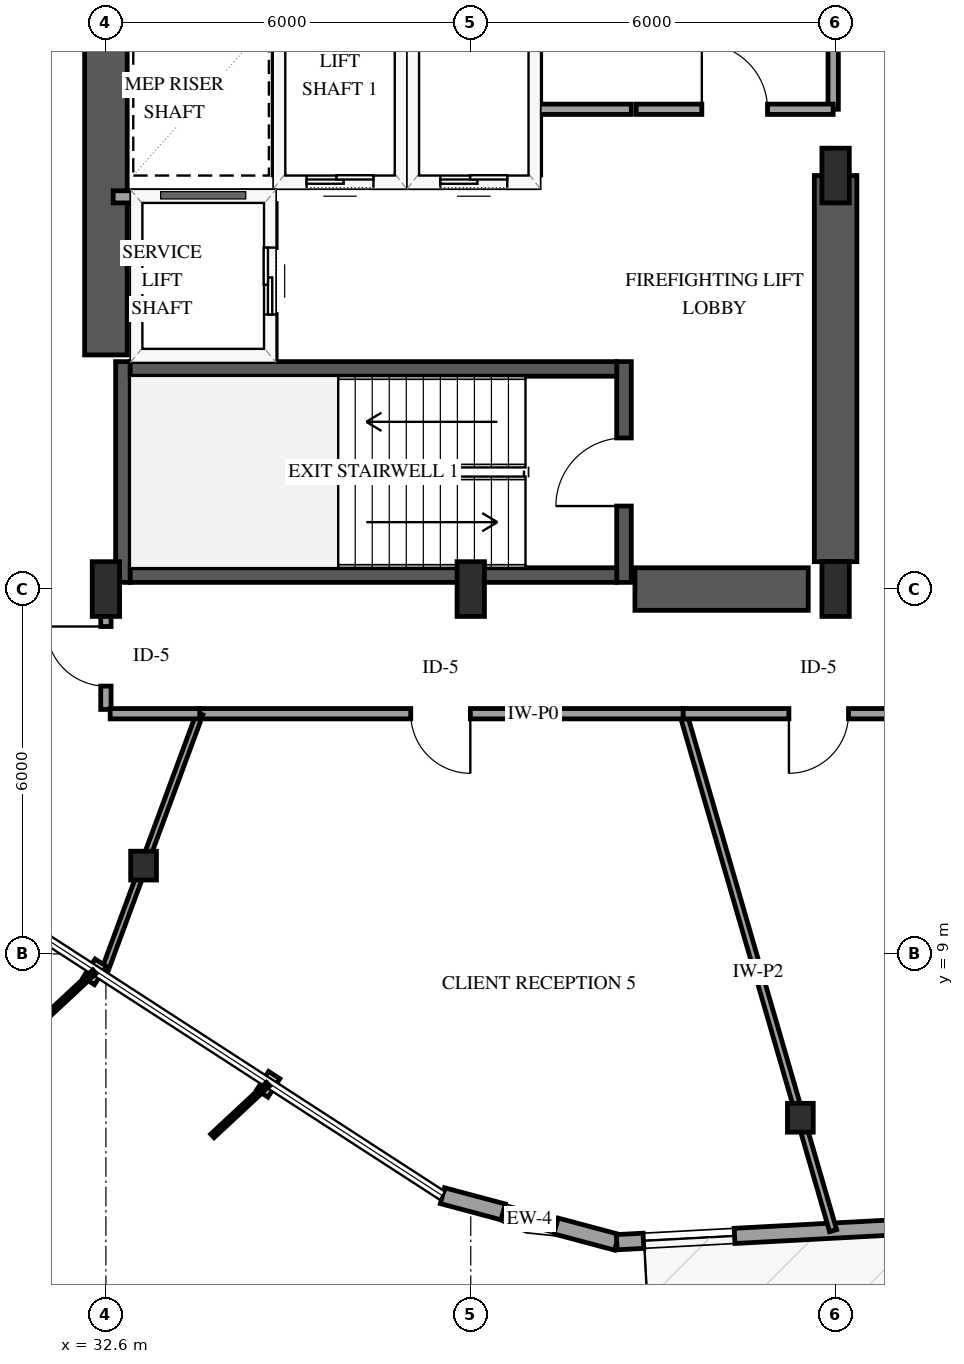
"""IFC4 building model, lengths in metres.
Left out: names, types, materials, properties, quantities, classifications, styles, units other than length and angle.
Written with IfcOpenShell. Run it as: python <this file> out.ifc"""

import sys

from ifc_helpers import new_model, si_unit, direction, frame, frame_2d, origin, origin_2d, place, context, subcontext, project, spatial, rectangle, i_section, extrude, element, fill, save


model = new_model("IFC4")
c1 = context("Model", 3, precision=1e-05, world=origin(), true_north=direction((0.0, 1.0)))
c2 = subcontext(c1, "Body", "Model", "MODEL_VIEW")
j1 = project(units=[si_unit("LENGTHUNIT", "METRE"), si_unit("PLANEANGLEUNIT", "RADIAN")], contexts=[c1])
p1 = place(None, origin())
s1 = spatial("IfcSite", under=j1, at=p1, CompositionType="ELEMENT")
p2 = place(p1, origin())
s2 = spatial("IfcBuilding", under=s1, at=p2, CompositionType="ELEMENT")
p3 = place(p2, frame((0.0, 0.0, 38.6)))
s3 = spatial("IfcBuildingStorey", under=s2, at=p3, CompositionType="ELEMENT", Elevation=38.6)
p4 = place(p3, frame((32.88, 15.11, 0.0), z_axis=(0.0, 0.0, 1.0), x_axis=(0.0, 1.0, 0.0)))
e1 = element("IfcWall", 1, at=p4, inside=s3, PredefinedType="SHEAR", context=c2, shape_type="SweptSolid", body=[
    extrude(rectangle(XDim=3.63, YDim=0.24, at=frame_2d((1.815, 0.0))), origin(), (0.0, 0.0, 1.0), 4.0),
])
p5 = place(p3, frame((41.12, 15.11, 0.0), z_axis=(0.0, 0.0, 1.0), x_axis=(0.0, 1.0, 0.0)))
e2 = element("IfcWall", 2, at=p5, inside=s3, PredefinedType="SHEAR", context=c2, shape_type="SweptSolid", body=[
    extrude(rectangle(XDim=3.63, YDim=0.24, at=frame_2d((1.815, 0.0))), origin(), (0.0, 0.0, 1.0), 4.0),
])
p6 = place(p5, frame((1.255, 0.0, 0.0)))
e3 = element("IfcOpeningElement", 3, at=p6, cuts=e2, PredefinedType="OPENING", context=c2, shape_type="SweptSolid", body=[
    extrude(rectangle(XDim=1.12, YDim=2.15, at=frame_2d((0.56, 1.075))), frame((0.0, 0.13, 0.0), z_axis=(0.0, -1.0, 0.0), x_axis=(1.0, 0.0, 0.0)), (0.0, 0.0, 1.0), 0.26),
])
for number, where, z_axis, x_axis in (
    (4, (33.0, 15.23, 0.0), (0.0, 0.0, 1.0), (1.0, 0.0, 0.0)),
    (5, (33.0, 18.62, 0.0), (0.0, 0.0, 1.0), (1.0, 0.0, 0.0)),
):
    element("IfcWall", number, at=place(p3, frame(where, z_axis=z_axis, x_axis=x_axis)), inside=s3, PredefinedType="SHEAR", context=c2, shape_type="SweptSolid", body=[
        extrude(rectangle(XDim=8.0, YDim=0.24, at=frame_2d((4.0, 0.0))), origin(), (0.0, 0.0, 1.0), 4.0),
    ])
p7 = place(p3, frame((32.6, 18.85, 0.0), z_axis=(0.0, 0.0, 1.0), x_axis=(0.0, 1.0, 0.0)))
e6 = element("IfcWall", 6, at=p7, inside=s3, PredefinedType="SHEAR", context=c2, shape_type="SweptSolid", body=[
    extrude(rectangle(XDim=12.3, YDim=0.7, at=frame_2d((6.15, 0.0))), origin(), (0.0, 0.0, 1.0), 4.0),
])
p8 = place(p3, frame((41.3, 15.0, 0.0), z_axis=(0.0, 0.0, 1.0), x_axis=(1.0, 0.0, 0.0)))
e7 = element("IfcWall", 7, at=p8, inside=s3, PredefinedType="SHEAR", context=c2, shape_type="SweptSolid", body=[
    extrude(rectangle(XDim=2.85, YDim=0.7, at=frame_2d((1.425, 0.0))), origin(), (0.0, 0.0, 1.0), 4.0),
])
p9 = place(p3, frame((44.6, 15.45, 0.0), z_axis=(0.0, 0.0, 1.0), x_axis=(0.0, 1.0, 0.0)))
e8 = element("IfcWall", 8, at=p9, inside=s3, PredefinedType="SHEAR", context=c2, shape_type="SweptSolid", body=[
    extrude(rectangle(XDim=6.35, YDim=0.7, at=frame_2d((3.175, 0.0))), origin(), (0.0, 0.0, 1.0), 4.0),
])
for number, where, z_axis, x_axis in (
    (9, (32.6, 15.0, 0.0), (0.0, 0.0, 1.0), (1.0, 0.0, 0.0)),
    (10, (38.6, 15.0, 0.0), (0.0, 0.0, 1.0), (1.0, 0.0, 0.0)),
    (11, (44.6, 15.0, 0.0), (0.0, 0.0, 1.0), (1.0, 0.0, 0.0)),
    (12, (44.6, 21.8, 0.0), (0.0, 0.0, 1.0), (1.0, 0.0, 0.0)),
):
    element("IfcColumn", number, at=place(p3, frame(where, z_axis=z_axis, x_axis=x_axis)), inside=s3, PredefinedType="PILASTER", context=c2, shape_type="SweptSolid", body=[
        extrude(rectangle(XDim=0.45, YDim=0.9, at=origin_2d()), origin(), (0.0, 0.0, 1.0), 4.0),
    ])
for number, where, z_axis, x_axis in (
    (13, (33.219, 10.452, 0.0), (0.0, 0.0, 1.0), (1.0, 0.0, 0.0)),
    (14, (44.02, 6.306, 0.0), (0.0, 0.0, 1.0), (1.0, 0.0, 0.0)),
):
    element("IfcColumn", number, at=place(p3, frame(where, z_axis=z_axis, x_axis=x_axis)), inside=s3, PredefinedType="COLUMN", context=c2, shape_type="SweptSolid", body=[
        extrude(i_section(OverallWidth=0.424, OverallDepth=0.474, WebThickness=0.048, FlangeThickness=0.077, FilletRadius=0.038, at=origin_2d()), origin(), (0.0, 0.0, 1.0), 4.0),
    ])
p10 = place(p3, frame((38.135, 5.024, 0.0), z_axis=(0.0, 0.0, 1.0), x_axis=(0.966192585346, -0.257821426615, 0.0)))
e15 = element("IfcWall", 15, at=p10, inside=s3, PredefinedType="SOLIDWALL", context=c2, shape_type="SweptSolid", body=[
    extrude(rectangle(XDim=2.967, YDim=0.27, at=frame_2d((1.483, 0.0))), origin(), (0.0, 0.0, 1.0), 3.079),
])
p11 = place(p10, frame((1.033, 0.0, 0.75)))
e16 = element("IfcOpeningElement", 16, at=p11, cuts=e15, PredefinedType="OPENING", context=c2, shape_type="SweptSolid", body=[
    extrude(rectangle(XDim=0.9, YDim=1.5, at=frame_2d((0.45, 0.75))), frame((0.0, 0.145, 0.0), z_axis=(0.0, -1.0, 0.0), x_axis=(1.0, 0.0, 0.0)), (0.0, 0.0, 1.0), 0.29),
])
p12 = place(p3, frame((41.001, 4.259, 0.0), z_axis=(0.0, 0.0, 1.0), x_axis=(0.998573514947, 0.053394149934, 0.0)))
e17 = element("IfcWall", 17, at=p12, inside=s3, PredefinedType="SOLIDWALL", context=c2, shape_type="SweptSolid", body=[
    extrude(rectangle(XDim=10.201, YDim=0.25, at=frame_2d((5.101, 0.0))), origin(), (0.0, 0.0, 1.0), 3.079),
])
p13 = place(p12, frame((4.601, 0.0, 0.0)))
e18 = element("IfcOpeningElement", 18, at=p13, cuts=e17, PredefinedType="OPENING", context=c2, shape_type="SweptSolid", body=[
    extrude(rectangle(XDim=1.05, YDim=2.15, at=frame_2d((0.525, 1.075))), frame((0.0, 0.135, 0.0), z_axis=(0.0, -1.0, 0.0), x_axis=(1.0, 0.0, 0.0)), (0.0, 0.0, 1.0), 0.27),
])
p14 = place(p12, frame((0.44, 0.0, 0.72)))
e19 = element("IfcOpeningElement", 19, at=p14, cuts=e17, PredefinedType="OPENING", context=c2, shape_type="SweptSolid", body=[
    extrude(rectangle(XDim=1.5, YDim=1.7, at=frame_2d((0.75, 0.85))), frame((0.0, 0.135, 0.0), z_axis=(0.0, -1.0, 0.0), x_axis=(1.0, 0.0, 0.0)), (0.0, 0.0, 1.0), 0.27),
])
p15 = place(p12, frame((6.291, 0.0, 0.72)))
e20 = element("IfcOpeningElement", 20, at=p15, cuts=e17, PredefinedType="OPENING", context=c2, shape_type="SweptSolid", body=[
    extrude(rectangle(XDim=1.5, YDim=1.7, at=frame_2d((0.75, 0.85))), frame((0.0, 0.135, 0.0), z_axis=(0.0, -1.0, 0.0), x_axis=(1.0, 0.0, 0.0)), (0.0, 0.0, 1.0), 0.27),
])
p16 = place(p3, frame((35.45, 21.7, 0.0), z_axis=(0.0, 0.0, 1.0), x_axis=(1.0, 0.0, 0.0)))
e21 = element("IfcWall", 21, at=p16, inside=s3, PredefinedType="SOLIDWALL", context=c2, shape_type="SweptSolid", body=[
    extrude(rectangle(XDim=2.0, YDim=0.2, at=frame_2d((1.0, 0.0))), origin(), (0.0, 0.0, 1.0), 3.7),
])
p17 = place(p16, frame((0.45, 0.0, 0.0)))
e22 = element("IfcOpeningElement", 22, at=p17, cuts=e21, PredefinedType="OPENING", context=c2, shape_type="SweptSolid", body=[
    extrude(rectangle(XDim=1.1, YDim=2.15, at=frame_2d((0.55, 1.075))), frame((0.0, 0.11, 0.0), z_axis=(0.0, -1.0, 0.0), x_axis=(1.0, 0.0, 0.0)), (0.0, 0.0, 1.0), 0.22),
])
for number, where, z_axis, x_axis in (
    (23, (35.45, 21.81, 0.0), (0.0, 0.0, 1.0), (0.0, 1.0, 0.0)),
    (24, (37.45, 21.81, 0.0), (0.0, 0.0, 1.0), (0.0, 1.0, 0.0)),
):
    element("IfcWall", number, at=place(p3, frame(where, z_axis=z_axis, x_axis=x_axis)), inside=s3, PredefinedType="SOLIDWALL", context=c2, shape_type="SweptSolid", body=[
        extrude(rectangle(XDim=2.38, YDim=0.2, at=frame_2d((1.19, 0.0))), origin(), (0.0, 0.0, 1.0), 3.7),
    ])
p18 = place(p3, frame((37.65, 21.7, 0.0), z_axis=(0.0, 0.0, 1.0), x_axis=(1.0, 0.0, 0.0)))
e25 = element("IfcWall", 25, at=p18, inside=s3, PredefinedType="SOLIDWALL", context=c2, shape_type="SweptSolid", body=[
    extrude(rectangle(XDim=2.0, YDim=0.2, at=frame_2d((1.0, 0.0))), origin(), (0.0, 0.0, 1.0), 3.7),
])
p19 = place(p18, frame((0.45, 0.0, 0.0)))
e26 = element("IfcOpeningElement", 26, at=p19, cuts=e25, PredefinedType="OPENING", context=c2, shape_type="SweptSolid", body=[
    extrude(rectangle(XDim=1.1, YDim=2.15, at=frame_2d((0.55, 1.075))), frame((0.0, 0.11, 0.0), z_axis=(0.0, -1.0, 0.0), x_axis=(1.0, 0.0, 0.0)), (0.0, 0.0, 1.0), 0.22),
])
p20 = place(p3, frame((39.65, 21.81, 0.0), z_axis=(0.0, 0.0, 1.0), x_axis=(0.0, 1.0, 0.0)))
e27 = element("IfcWall", 27, at=p20, inside=s3, PredefinedType="SOLIDWALL", context=c2, shape_type="SweptSolid", body=[
    extrude(rectangle(XDim=2.38, YDim=0.2, at=frame_2d((1.19, 0.0))), origin(), (0.0, 0.0, 1.0), 3.7),
])
p21 = place(p3, frame((32.72, 21.45, 0.0), z_axis=(0.0, 0.0, 1.0), x_axis=(1.0, 0.0, 0.0)))
e28 = element("IfcWall", 28, at=p21, inside=s3, PredefinedType="SOLIDWALL", context=c2, shape_type="SweptSolid", body=[
    extrude(rectangle(XDim=2.58, YDim=0.2, at=frame_2d((1.29, 0.0))), origin(), (0.0, 0.0, 1.0), 3.7),
])
p22 = place(p3, frame((35.3, 18.79, 0.0), z_axis=(0.0, 0.0, 1.0), x_axis=(0.0, 1.0, 0.0)))
e29 = element("IfcWall", 29, at=p22, inside=s3, PredefinedType="SOLIDWALL", context=c2, shape_type="SweptSolid", body=[
    extrude(rectangle(XDim=2.55, YDim=0.2, at=frame_2d((1.275, 0.0))), origin(), (0.0, 0.0, 1.0), 3.7),
])
p23 = place(p22, frame((0.725, 0.0, 0.0)))
e30 = element("IfcOpeningElement", 30, at=p23, cuts=e29, PredefinedType="OPENING", context=c2, shape_type="SweptSolid", body=[
    extrude(rectangle(XDim=1.1, YDim=2.15, at=frame_2d((0.55, 1.075))), frame((0.0, 0.11, 0.0), z_axis=(0.0, -1.0, 0.0), x_axis=(1.0, 0.0, 0.0)), (0.0, 0.0, 1.0), 0.22),
])
p24 = place(p3, frame((42.094, 12.95, 0.0), z_axis=(0.0, 0.0, 1.0), x_axis=(0.27850409571, -0.96043504136, 0.0)))
e31 = element("IfcWall", 31, at=p24, inside=s3, PredefinedType="PARTITIONING", context=c2, shape_type="SweptSolid", body=[
    extrude(rectangle(XDim=8.851, YDim=0.12, at=frame_2d((4.426, 0.0))), origin(), (0.0, 0.0, 1.0), 2.995),
])
p25 = place(p3, frame((42.094, 12.95, 0.0), z_axis=(0.0, 0.0, 1.0), x_axis=(-1.0, 0.0, 0.0)))
e32 = element("IfcWall", 32, at=p25, inside=s3, PredefinedType="PARTITIONING", context=c2, shape_type="SweptSolid", body=[
    extrude(rectangle(XDim=7.951, YDim=0.17, at=frame_2d((3.976, 0.0))), origin(), (0.0, 0.0, 1.0), 3.7),
])
p26 = place(p25, frame((3.501, 0.0, 0.0)))
e33 = element("IfcOpeningElement", 33, at=p26, cuts=e32, PredefinedType="OPENING", context=c2, shape_type="SweptSolid", body=[
    extrude(rectangle(XDim=0.98, YDim=2.15, at=frame_2d((0.49, 1.075))), frame((0.0, 0.095, 0.0), z_axis=(0.0, -1.0, 0.0), x_axis=(1.0, 0.0, 0.0)), (0.0, 0.0, 1.0), 0.19),
])
p27 = place(p3, frame((44.56, 29.8, 0.0), z_axis=(0.0, 0.0, 1.0), x_axis=(0.0, -1.0, 0.0)))
e34 = element("IfcWall", 34, at=p27, inside=s3, PredefinedType="PARTITIONING", context=c2, shape_type="SweptSolid", body=[
    extrude(rectangle(XDim=6.91, YDim=0.17, at=frame_2d((3.455, 0.0))), origin(), (0.0, 0.0, 1.0), 2.74),
])
p28 = place(p27, frame((2.915, 0.0, 0.0)))
e35 = element("IfcOpeningElement", 35, at=p28, cuts=e34, PredefinedType="OPENING", context=c2, shape_type="SweptSolid", body=[
    extrude(rectangle(XDim=1.08, YDim=2.15, at=frame_2d((0.54, 1.075))), frame((0.0, 0.095, 0.0), z_axis=(0.0, -1.0, 0.0), x_axis=(1.0, 0.0, 0.0)), (0.0, 0.0, 1.0), 0.19),
])
p29 = place(p3, frame((34.143, 12.95, 0.0), z_axis=(0.0, 0.0, 1.0), x_axis=(-0.346838221827, -0.937924969217, 0.0)))
e36 = element("IfcWall", 36, at=p29, inside=s3, PredefinedType="PARTITIONING", context=c2, shape_type="SweptSolid", body=[
    extrude(rectangle(XDim=4.593, YDim=0.11, at=frame_2d((2.296, 0.0))), origin(), (0.0, 0.0, 1.0), 2.995),
])
p30 = place(p3, frame((46.58, 12.95, 0.0), z_axis=(0.0, 0.0, 1.0), x_axis=(-1.0, 0.0, 0.0)))
e37 = element("IfcWall", 37, at=p30, inside=s3, PredefinedType="PARTITIONING", context=c2, shape_type="SweptSolid", body=[
    extrude(rectangle(XDim=4.486, YDim=0.17, at=frame_2d((2.243, 0.0))), origin(), (0.0, 0.0, 1.0), 3.7),
])
p31 = place(p30, frame((1.768, 0.0, 0.0)))
e38 = element("IfcOpeningElement", 38, at=p31, cuts=e37, PredefinedType="OPENING", context=c2, shape_type="SweptSolid", body=[
    extrude(rectangle(XDim=0.98, YDim=2.15, at=frame_2d((0.49, 1.075))), frame((0.0, 0.095, 0.0), z_axis=(0.0, -1.0, 0.0), x_axis=(1.0, 0.0, 0.0)), (0.0, 0.0, 1.0), 0.19),
])
p32 = place(p3, frame((41.32, 22.89, 0.0), z_axis=(0.0, 0.0, 1.0), x_axis=(1.0, 0.0, 0.0)))
e39 = element("IfcWall", 39, at=p32, inside=s3, PredefinedType="PARTITIONING", context=c2, shape_type="SweptSolid", body=[
    extrude(rectangle(XDim=3.24, YDim=0.17, at=frame_2d((1.62, 0.0))), origin(), (0.0, 0.0, 1.0), 3.7),
])
p33 = place(p32, frame((1.08, 0.0, 0.0)))
e40 = element("IfcOpeningElement", 40, at=p33, cuts=e39, PredefinedType="OPENING", context=c2, shape_type="SweptSolid", body=[
    extrude(rectangle(XDim=1.08, YDim=2.15, at=frame_2d((0.54, 1.075))), frame((0.0, 0.095, 0.0), z_axis=(0.0, -1.0, 0.0), x_axis=(1.0, 0.0, 0.0)), (0.0, 0.0, 1.0), 0.19),
])
p34 = place(p3, frame((32.6, 13.02, 0.0), z_axis=(0.0, 0.0, 1.0), x_axis=(0.0, 1.0, 0.0)))
e41 = element("IfcWall", 41, at=p34, inside=s3, PredefinedType="PARTITIONING", context=c2, shape_type="SweptSolid", body=[
    extrude(rectangle(XDim=1.91, YDim=0.17, at=frame_2d((0.955, 0.0))), origin(), (0.0, 0.0, 1.0), 3.7),
])
p35 = place(p34, frame((0.384, 0.0, 0.0)))
e42 = element("IfcOpeningElement", 42, at=p35, cuts=e41, PredefinedType="OPENING", context=c2, shape_type="SweptSolid", body=[
    extrude(rectangle(XDim=0.98, YDim=2.15, at=frame_2d((0.49, 1.075))), frame((0.0, 0.095, 0.0), z_axis=(0.0, -1.0, 0.0), x_axis=(1.0, 0.0, 0.0)), (0.0, 0.0, 1.0), 0.19),
])
p36 = place(p3, frame((39.72, 22.89, 0.0), z_axis=(0.0, 0.0, 1.0), x_axis=(1.0, 0.0, 0.0)))
e43 = element("IfcWall", 43, at=p36, inside=s3, PredefinedType="PARTITIONING", context=c2, shape_type="SweptSolid", body=[
    extrude(rectangle(XDim=1.52, YDim=0.17, at=frame_2d((0.76, 0.0))), origin(), (0.0, 0.0, 1.0), 3.7),
])
p37 = place(p3, frame((34.143, 12.95, 0.0), z_axis=(0.0, 0.0, 1.0), x_axis=(-1.0, 0.0, 0.0)))
e44 = element("IfcWall", 44, at=p37, inside=s3, PredefinedType="PARTITIONING", context=c2, shape_type="SweptSolid", body=[
    extrude(rectangle(XDim=1.473, YDim=0.17, at=frame_2d((0.737, 0.0))), origin(), (0.0, 0.0, 1.0), 3.7),
])
p38 = place(p11, origin())
e45 = element("IfcWindow", 45, at=p38, inside=s3, PartitioningType="SINGLE_PANEL", PredefinedType="WINDOW", context=c2, shape_type="SweptSolid", body=[
    extrude(rectangle(XDim=0.9, YDim=1.5, at=frame_2d((0.45, 0.75))), frame((0.0, 0.03, 0.0), z_axis=(0.0, -1.0, 0.0), x_axis=(1.0, 0.0, 0.0)), (0.0, 0.0, 1.0), 0.06),
])
fill(e16, e45)
p39 = place(p14, origin())
e46 = element("IfcWindow", 46, at=p39, inside=s3, PartitioningType="SINGLE_PANEL", PredefinedType="WINDOW", context=c2, shape_type="SweptSolid", body=[
    extrude(rectangle(XDim=1.5, YDim=1.7, at=frame_2d((0.75, 0.85))), frame((0.0, 0.03, 0.0), z_axis=(0.0, -1.0, 0.0), x_axis=(1.0, 0.0, 0.0)), (0.0, 0.0, 1.0), 0.06),
])
fill(e19, e46)
p40 = place(p17, origin())
e47 = element("IfcDoor", 47, at=p40, inside=s3, OperationType="SLIDING_TO_LEFT", PredefinedType="DOOR", context=c2, shape_type="SweptSolid", body=[
    extrude(rectangle(XDim=1.1, YDim=2.15, at=frame_2d((0.55, 1.075))), frame((0.0, 0.025, 0.0), z_axis=(0.0, -1.0, 0.0), x_axis=(1.0, 0.0, 0.0)), (0.0, 0.0, 1.0), 0.05),
])
fill(e22, e47)
p41 = place(p19, origin())
e48 = element("IfcDoor", 48, at=p41, inside=s3, OperationType="SLIDING_TO_LEFT", PredefinedType="DOOR", context=c2, shape_type="SweptSolid", body=[
    extrude(rectangle(XDim=1.1, YDim=2.15, at=frame_2d((0.55, 1.075))), frame((0.0, 0.025, 0.0), z_axis=(0.0, -1.0, 0.0), x_axis=(1.0, 0.0, 0.0)), (0.0, 0.0, 1.0), 0.05),
])
fill(e26, e48)
p42 = place(p23, origin())
e49 = element("IfcDoor", 49, at=p42, inside=s3, OperationType="SLIDING_TO_LEFT", PredefinedType="DOOR", context=c2, shape_type="SweptSolid", body=[
    extrude(rectangle(XDim=1.1, YDim=2.15, at=frame_2d((0.55, 1.075))), frame((0.0, 0.025, 0.0), z_axis=(0.0, -1.0, 0.0), x_axis=(1.0, 0.0, 0.0)), (0.0, 0.0, 1.0), 0.05),
])
fill(e30, e49)
p43 = place(p6, origin())
e50 = element("IfcDoor", 50, at=p43, inside=s3, OperationType="SINGLE_SWING_LEFT", PredefinedType="DOOR", context=c2, shape_type="SweptSolid", body=[
    extrude(rectangle(XDim=1.12, YDim=2.15, at=frame_2d((0.56, 1.075))), frame((0.0, 0.025, 0.0), z_axis=(0.0, -1.0, 0.0), x_axis=(1.0, 0.0, 0.0)), (0.0, 0.0, 1.0), 0.05),
])
fill(e3, e50)
p44 = place(p26, origin())
e51 = element("IfcDoor", 51, at=p44, inside=s3, OperationType="SINGLE_SWING_LEFT", PredefinedType="DOOR", context=c2, shape_type="SweptSolid", body=[
    extrude(rectangle(XDim=0.98, YDim=2.15, at=frame_2d((0.49, 1.075))), frame((0.0, 0.025, 0.0), z_axis=(0.0, -1.0, 0.0), x_axis=(1.0, 0.0, 0.0)), (0.0, 0.0, 1.0), 0.05),
])
fill(e33, e51)
p45 = place(p31, origin())
e52 = element("IfcDoor", 52, at=p45, inside=s3, OperationType="SINGLE_SWING_RIGHT", PredefinedType="DOOR", context=c2, shape_type="SweptSolid", body=[
    extrude(rectangle(XDim=0.98, YDim=2.15, at=frame_2d((0.49, 1.075))), frame((0.0, 0.025, 0.0), z_axis=(0.0, -1.0, 0.0), x_axis=(1.0, 0.0, 0.0)), (0.0, 0.0, 1.0), 0.05),
])
fill(e38, e52)
p46 = place(p33, origin())
e53 = element("IfcDoor", 53, at=p46, inside=s3, OperationType="SINGLE_SWING_LEFT", PredefinedType="DOOR", context=c2, shape_type="SweptSolid", body=[
    extrude(rectangle(XDim=1.08, YDim=2.15, at=frame_2d((0.54, 1.075))), frame((0.0, 0.025, 0.0), z_axis=(0.0, -1.0, 0.0), x_axis=(1.0, 0.0, 0.0)), (0.0, 0.0, 1.0), 0.05),
])
fill(e40, e53)
p47 = place(p35, origin())
e54 = element("IfcDoor", 54, at=p47, inside=s3, OperationType="SINGLE_SWING_RIGHT", PredefinedType="DOOR", context=c2, shape_type="SweptSolid", body=[
    extrude(rectangle(XDim=0.98, YDim=2.15, at=frame_2d((0.49, 1.075))), frame((0.0, 0.025, 0.0), z_axis=(0.0, -1.0, 0.0), x_axis=(1.0, 0.0, 0.0)), (0.0, 0.0, 1.0), 0.05),
])
fill(e42, e54)
save(model, sys.argv[1])
